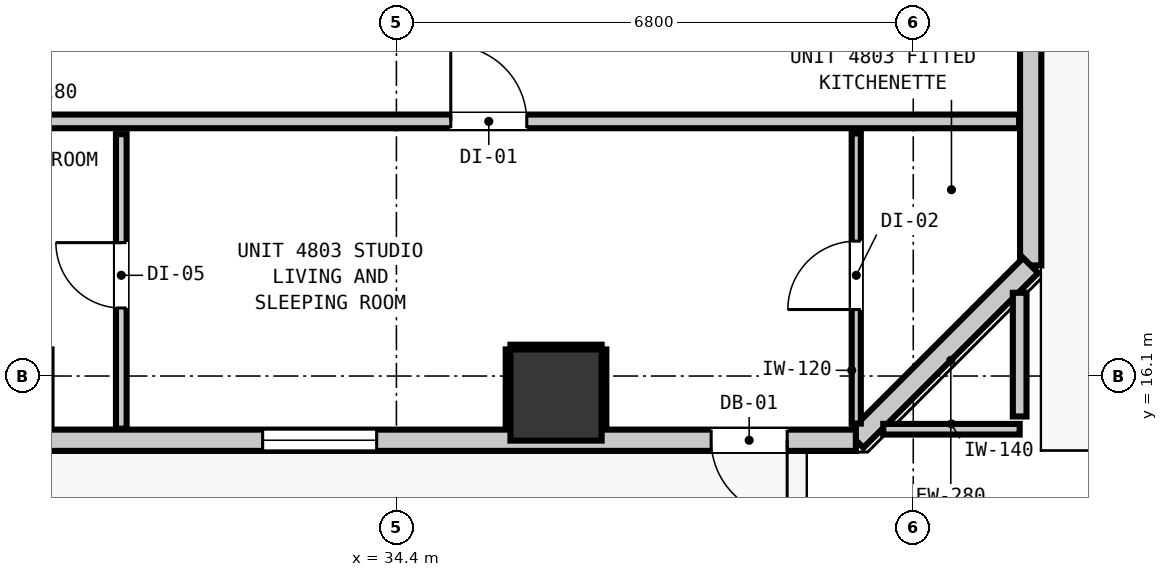
"""IFC4 building model, lengths in metres.
Left out: names, types, materials, properties, quantities, classifications, styles, units other than length and angle.
Written with IfcOpenShell. Run it as: python <this file> out.ifc"""

import sys

from ifc_helpers import new_model, si_unit, direction, frame, frame_2d, origin, origin_2d, place, context, subcontext, project, spatial, rectangle, extrude, element, fill, save


model = new_model("IFC4")
c1 = context("Model", 3, precision=1e-05, world=origin(), true_north=direction((0.0, 1.0)))
c2 = subcontext(c1, "Body", "Model", "MODEL_VIEW")
j1 = project(units=[si_unit("LENGTHUNIT", "METRE"), si_unit("PLANEANGLEUNIT", "RADIAN")], contexts=[c1])
p1 = place(None, origin())
s1 = spatial("IfcSite", under=j1, at=p1, CompositionType="ELEMENT")
p2 = place(p1, origin())
s2 = spatial("IfcBuilding", under=s1, at=p2, CompositionType="ELEMENT")
p3 = place(p2, frame((0.0, 0.0, 165.84)))
s3 = spatial("IfcBuildingStorey", under=s2, at=p3, CompositionType="ELEMENT", Elevation=165.84)
p4 = place(p3, frame((36.5, 15.85, -0.2), z_axis=(0.0, 0.0, 1.0), x_axis=(1.0, 0.0, 0.0)))
e1 = element("IfcColumn", 1, at=p4, inside=s3, PredefinedType="COLUMN", context=c2, shape_type="SweptSolid", body=[
    extrude(rectangle(XDim=1.2, YDim=1.2, at=origin_2d()), origin(), (0.0, 0.0, 1.0), 3.52),
])
p5 = place(p3, frame((42.745, 49.845, 0.0), z_axis=(0.0, 0.0, 1.0), x_axis=(0.0, -1.0, 0.0)))
e2 = element("IfcWall", 2, at=p5, inside=s3, PredefinedType="STANDARD", context=c2, shape_type="SweptSolid", body=[
    extrude(rectangle(XDim=32.29, YDim=0.28, at=frame_2d((16.145, 0.0))), origin(), (0.0, 0.0, 1.0), 3.08),
])
p6 = place(p5, frame((0.503, 0.0, 0.0)))
e3 = element("IfcOpeningElement", 3, at=p6, cuts=e2, PredefinedType="OPENING", context=c2, shape_type="SweptSolid", body=[
    extrude(rectangle(XDim=1.1, YDim=2.15, at=frame_2d((0.55, 1.075))), frame((0.0, 0.15, 0.0), z_axis=(0.0, -1.0, 0.0), x_axis=(1.0, 0.0, 0.0)), (0.0, 0.0, 1.0), 0.3),
])
p7 = place(p5, frame((2.699, 0.0, 0.85)))
e4 = element("IfcOpeningElement", 4, at=p7, cuts=e2, PredefinedType="OPENING", context=c2, shape_type="SweptSolid", body=[
    extrude(rectangle(XDim=1.5, YDim=1.8, at=frame_2d((0.75, 0.9))), frame((0.0, 0.15, 0.0), z_axis=(0.0, -1.0, 0.0), x_axis=(1.0, 0.0, 0.0)), (0.0, 0.0, 1.0), 0.3),
])
p8 = place(p5, frame((23.17, 0.0, 0.85)))
e5 = element("IfcOpeningElement", 5, at=p8, cuts=e2, PredefinedType="OPENING", context=c2, shape_type="SweptSolid", body=[
    extrude(rectangle(XDim=1.5, YDim=1.8, at=frame_2d((0.75, 0.9))), frame((0.0, 0.15, 0.0), z_axis=(0.0, -1.0, 0.0), x_axis=(1.0, 0.0, 0.0)), (0.0, 0.0, 1.0), 0.3),
])
p9 = place(p5, frame((13.62, 0.0, 0.85)))
e6 = element("IfcOpeningElement", 6, at=p9, cuts=e2, PredefinedType="OPENING", context=c2, shape_type="SweptSolid", body=[
    extrude(rectangle(XDim=1.5, YDim=1.8, at=frame_2d((0.75, 0.9))), frame((0.0, 0.15, 0.0), z_axis=(0.0, -1.0, 0.0), x_axis=(1.0, 0.0, 0.0)), (0.0, 0.0, 1.0), 0.3),
])
p10 = place(p3, frame((42.745, 17.555, 0.0), z_axis=(0.0, 0.0, 1.0), x_axis=(-0.707106781187, -0.707106781187, 0.0)))
e7 = element("IfcWall", 7, at=p10, inside=s3, PredefinedType="STANDARD", context=c2, shape_type="SweptSolid", body=[
    extrude(rectangle(XDim=3.253, YDim=0.28, at=frame_2d((1.626, 0.0))), origin(), (0.0, 0.0, 1.0), 3.08),
])
p11 = place(p3, frame((40.445, 15.255, 0.0), z_axis=(0.0, 0.0, 1.0), x_axis=(-1.0, 0.0, 0.0)))
e8 = element("IfcWall", 8, at=p11, inside=s3, PredefinedType="STANDARD", context=c2, shape_type="SweptSolid", body=[
    extrude(rectangle(XDim=35.09, YDim=0.28, at=frame_2d((17.545, 0.0))), origin(), (0.0, 0.0, 1.0), 3.08),
])
p12 = place(p11, frame((0.904, 0.0, 0.0)))
e9 = element("IfcOpeningElement", 9, at=p12, cuts=e8, PredefinedType="OPENING", context=c2, shape_type="SweptSolid", body=[
    extrude(rectangle(XDim=1.0, YDim=2.15, at=frame_2d((0.5, 1.075))), frame((0.0, 0.15, 0.0), z_axis=(0.0, -1.0, 0.0), x_axis=(1.0, 0.0, 0.0)), (0.0, 0.0, 1.0), 0.3),
])
p13 = place(p11, frame((30.573, 0.0, 0.85)))
e10 = element("IfcOpeningElement", 10, at=p13, cuts=e8, PredefinedType="OPENING", context=c2, shape_type="SweptSolid", body=[
    extrude(rectangle(XDim=1.5, YDim=1.8, at=frame_2d((0.75, 0.9))), frame((0.0, 0.15, 0.0), z_axis=(0.0, -1.0, 0.0), x_axis=(1.0, 0.0, 0.0)), (0.0, 0.0, 1.0), 0.3),
])
p14 = place(p11, frame((15.82, 0.0, 0.85)))
e11 = element("IfcOpeningElement", 11, at=p14, cuts=e8, PredefinedType="OPENING", context=c2, shape_type="SweptSolid", body=[
    extrude(rectangle(XDim=1.5, YDim=1.8, at=frame_2d((0.75, 0.9))), frame((0.0, 0.15, 0.0), z_axis=(0.0, -1.0, 0.0), x_axis=(1.0, 0.0, 0.0)), (0.0, 0.0, 1.0), 0.3),
])
p15 = place(p11, frame((6.305, 0.0, 0.85)))
e12 = element("IfcOpeningElement", 12, at=p15, cuts=e8, PredefinedType="OPENING", context=c2, shape_type="SweptSolid", body=[
    extrude(rectangle(XDim=1.5, YDim=1.8, at=frame_2d((0.75, 0.9))), frame((0.0, 0.15, 0.0), z_axis=(0.0, -1.0, 0.0), x_axis=(1.0, 0.0, 0.0)), (0.0, 0.0, 1.0), 0.3),
])
p16 = place(p3, frame((12.983, 19.45, 0.0), z_axis=(0.0, 0.0, 1.0), x_axis=(1.0, 0.0, 0.0)))
e13 = element("IfcWall", 13, at=p16, inside=s3, PredefinedType="PARTITIONING", context=c2, shape_type="SweptSolid", body=[
    extrude(rectangle(XDim=29.61, YDim=0.18, at=frame_2d((14.805, 0.0))), origin(), (0.0, 0.0, 1.0), 3.08),
])
p17 = place(p16, frame((10.392, 0.0, 0.0)))
e14 = element("IfcOpeningElement", 14, at=p17, cuts=e13, PredefinedType="OPENING", context=c2, shape_type="SweptSolid", body=[
    extrude(rectangle(XDim=1.0, YDim=2.15, at=frame_2d((0.5, 1.075))), frame((0.0, 0.1, 0.0), z_axis=(0.0, -1.0, 0.0), x_axis=(1.0, 0.0, 0.0)), (0.0, 0.0, 1.0), 0.2),
])
p18 = place(p16, frame((22.132, 0.0, 0.0)))
e15 = element("IfcOpeningElement", 15, at=p18, cuts=e13, PredefinedType="OPENING", context=c2, shape_type="SweptSolid", body=[
    extrude(rectangle(XDim=1.0, YDim=2.15, at=frame_2d((0.5, 1.075))), frame((0.0, 0.1, 0.0), z_axis=(0.0, -1.0, 0.0), x_axis=(1.0, 0.0, 0.0)), (0.0, 0.0, 1.0), 0.2),
])
p19 = place(p3, frame((40.805, 15.4, 0.0), z_axis=(0.0, 0.0, 1.0), x_axis=(1.0, 0.0, 0.0)))
e16 = element("IfcWall", 16, at=p19, inside=s3, PredefinedType="PARTITIONING", context=c2, shape_type="SweptSolid", body=[
    extrude(rectangle(XDim=1.795, YDim=0.14, at=frame_2d((0.897, 0.0))), origin(), (0.0, 0.0, 1.0), 3.08),
])
p20 = place(p3, frame((42.6, 15.568, 0.0), z_axis=(0.0, 0.0, 1.0), x_axis=(0.0, 1.0, 0.0)))
e17 = element("IfcWall", 17, at=p20, inside=s3, PredefinedType="PARTITIONING", context=c2, shape_type="SweptSolid", body=[
    extrude(rectangle(XDim=1.627, YDim=0.18, at=frame_2d((0.813, 0.0))), origin(), (0.0, 0.0, 1.0), 3.08),
])
p21 = place(p3, frame((30.78, 15.407, 0.0), z_axis=(0.0, 0.0, 1.0), x_axis=(0.0, 1.0, 0.0)))
e18 = element("IfcWall", 18, at=p21, inside=s3, PredefinedType="PARTITIONING", context=c2, shape_type="SweptSolid", body=[
    extrude(rectangle(XDim=3.875, YDim=0.14, at=frame_2d((1.938, 0.0))), origin(), (0.0, 0.0, 1.0), 3.08),
])
p22 = place(p21, frame((1.588, 0.0, 0.0)))
e19 = element("IfcOpeningElement", 19, at=p22, cuts=e18, PredefinedType="OPENING", context=c2, shape_type="SweptSolid", body=[
    extrude(rectangle(XDim=0.86, YDim=2.02, at=frame_2d((0.43, 1.01))), frame((0.0, 0.08, 0.0), z_axis=(0.0, -1.0, 0.0), x_axis=(1.0, 0.0, 0.0)), (0.0, 0.0, 1.0), 0.16),
])
p23 = place(p3, frame((40.45, 15.475, 0.0), z_axis=(0.0, 0.0, 1.0), x_axis=(0.0, 1.0, 0.0)))
e20 = element("IfcWall", 20, at=p23, inside=s3, PredefinedType="PARTITIONING", context=c2, shape_type="SweptSolid", body=[
    extrude(rectangle(XDim=3.817, YDim=0.12, at=frame_2d((1.908, 0.0))), origin(), (0.0, 0.0, 1.0), 3.08),
])
p24 = place(p23, frame((1.5, 0.0, 0.0)))
e21 = element("IfcOpeningElement", 21, at=p24, cuts=e20, PredefinedType="OPENING", context=c2, shape_type="SweptSolid", body=[
    extrude(rectangle(XDim=0.9, YDim=2.1, at=frame_2d((0.45, 1.05))), frame((0.0, 0.07, 0.0), z_axis=(0.0, -1.0, 0.0), x_axis=(1.0, 0.0, 0.0)), (0.0, 0.0, 1.0), 0.14),
])
p25 = place(p3, frame((35.9, 16.482, 0.0), z_axis=(0.0, 0.0, 1.0), x_axis=(1.0, 0.0, 0.0)))
e22 = element("IfcWall", 22, at=p25, inside=s3, PredefinedType="PARTITIONING", context=c2, shape_type="SweptSolid", body=[
    extrude(rectangle(XDim=1.2, YDim=0.06, at=frame_2d((0.6, 0.0))), origin(), (0.0, 0.0, 1.0), 1.45),
])
for number, where, z_axis, x_axis in (
    (23, (35.868, 15.41, 0.0), (0.0, 0.0, 1.0), (0.0, 1.0, 0.0)),
    (24, (37.132, 15.41, 0.0), (0.0, 0.0, 1.0), (0.0, 1.0, 0.0)),
):
    element("IfcWall", number, at=place(p3, frame(where, z_axis=z_axis, x_axis=x_axis)), inside=s3, PredefinedType="PARTITIONING", context=c2, shape_type="SweptSolid", body=[
        extrude(rectangle(XDim=1.04, YDim=0.06, at=frame_2d((0.52, 0.0))), origin(), (0.0, 0.0, 1.0), 1.45),
    ])
p26 = place(p12, origin())
e25 = element("IfcDoor", 25, at=p26, inside=s3, OperationType="SINGLE_SWING_LEFT", PredefinedType="DOOR", context=c2, shape_type="SweptSolid", body=[
    extrude(rectangle(XDim=1.0, YDim=2.15, at=frame_2d((0.5, 1.075))), frame((0.0, 0.025, 0.0), z_axis=(0.0, -1.0, 0.0), x_axis=(1.0, 0.0, 0.0)), (0.0, 0.0, 1.0), 0.05),
])
fill(e9, e25)
p27 = place(p15, origin())
e26 = element("IfcWindow", 26, at=p27, inside=s3, PartitioningType="SINGLE_PANEL", PredefinedType="WINDOW", context=c2, shape_type="SweptSolid", body=[
    extrude(rectangle(XDim=1.5, YDim=1.8, at=frame_2d((0.75, 0.9))), frame((0.0, 0.03, 0.0), z_axis=(0.0, -1.0, 0.0), x_axis=(1.0, 0.0, 0.0)), (0.0, 0.0, 1.0), 0.06),
])
fill(e12, e26)
p28 = place(p18, origin())
e27 = element("IfcDoor", 27, at=p28, inside=s3, OperationType="SINGLE_SWING_LEFT", PredefinedType="DOOR", context=c2, shape_type="SweptSolid", body=[
    extrude(rectangle(XDim=1.0, YDim=2.15, at=frame_2d((0.5, 1.075))), frame((0.0, 0.025, 0.0), z_axis=(0.0, -1.0, 0.0), x_axis=(1.0, 0.0, 0.0)), (0.0, 0.0, 1.0), 0.05),
])
fill(e15, e27)
p29 = place(p22, origin())
e28 = element("IfcDoor", 28, at=p29, inside=s3, OperationType="SINGLE_SWING_RIGHT", PredefinedType="DOOR", context=c2, shape_type="SweptSolid", body=[
    extrude(rectangle(XDim=0.86, YDim=2.02, at=frame_2d((0.43, 1.01))), frame((0.0, 0.025, 0.0), z_axis=(0.0, -1.0, 0.0), x_axis=(1.0, 0.0, 0.0)), (0.0, 0.0, 1.0), 0.05),
])
fill(e19, e28)
p30 = place(p24, origin())
e29 = element("IfcDoor", 29, at=p30, inside=s3, OperationType="SINGLE_SWING_LEFT", PredefinedType="DOOR", context=c2, shape_type="SweptSolid", body=[
    extrude(rectangle(XDim=0.9, YDim=2.1, at=frame_2d((0.45, 1.05))), frame((0.0, 0.025, 0.0), z_axis=(0.0, -1.0, 0.0), x_axis=(1.0, 0.0, 0.0)), (0.0, 0.0, 1.0), 0.05),
])
fill(e21, e29)
save(model, sys.argv[1])
